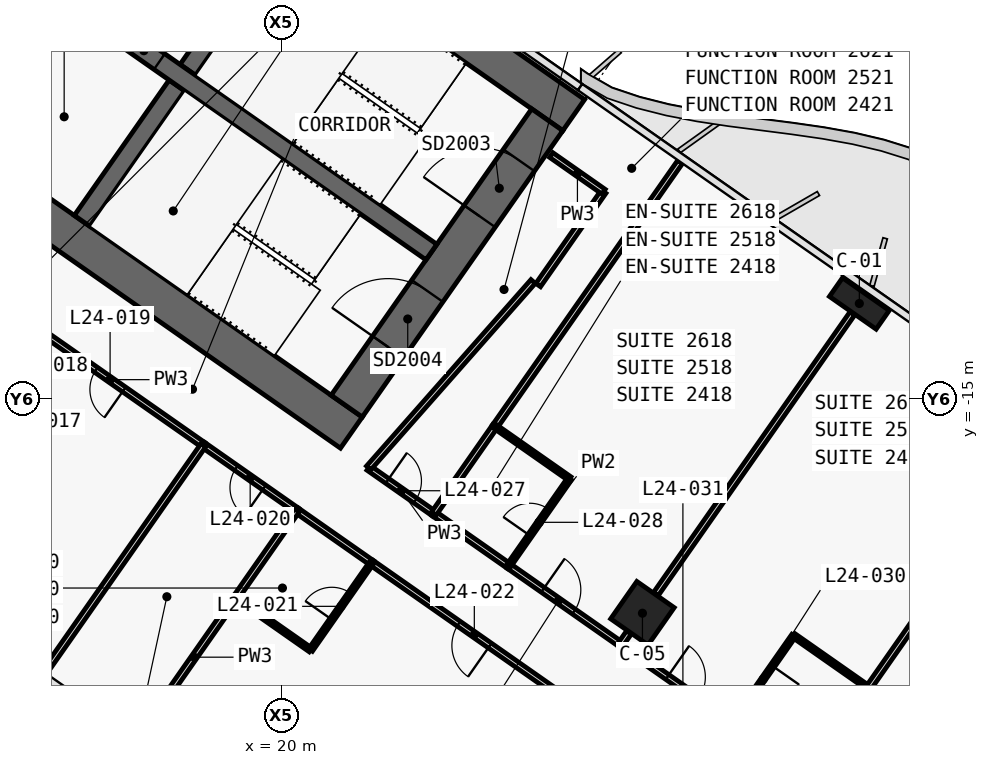
"""IFC4 building model, lengths in metres.
Left out: names, types, materials, properties, quantities, classifications, styles, units other than length and angle.
Written with IfcOpenShell. Run it as: python <this file> out.ifc"""

import sys

from ifc_helpers import new_model, si_unit, direction, frame, frame_2d, origin, origin_2d, place, context, subcontext, project, spatial, polyline, rectangle, outline, extrude, element, fill, save


model = new_model("IFC4")
c1 = context("Model", 3, precision=1e-05, world=origin(), true_north=direction((0.0, 1.0)))
c2 = subcontext(c1, "Body", "Model", "MODEL_VIEW")
j1 = project(units=[si_unit("LENGTHUNIT", "METRE"), si_unit("PLANEANGLEUNIT", "RADIAN")], contexts=[c1])
p1 = place(None, origin())
s1 = spatial("IfcSite", under=j1, at=p1, CompositionType="ELEMENT")
p2 = place(p1, origin())
s2 = spatial("IfcBuilding", under=s1, at=p2, CompositionType="ELEMENT")
p3 = place(p2, frame((0.0, 0.0, 112.1)))
s3 = spatial("IfcBuildingStorey", under=s2, at=p3, CompositionType="ELEMENT", Elevation=112.1)
p4 = place(p3, frame((-0.037, 11.867, 0.0), z_axis=(0.0, 0.0, 1.0), x_axis=(0.819155306259, -0.573571777746, 0.0)))
e1 = element("IfcWall", 1, at=p4, inside=s3, PredefinedType="SHEAR", context=c2, shape_type="SweptSolid", body=[
    extrude(outline(polyline([(33.837, 0.5), (0.0, 0.5), (0.7, -0.5), (33.837, -0.5), (33.837, 0.5)])), origin(), (0.0, 0.0, 1.0), 3.6),
])
p5 = place(p3, frame((-0.037, -0.585, 0.0), z_axis=(0.0, 0.0, 1.0), x_axis=(0.819157152511, -0.573569140985, 0.0)))
e2 = element("IfcWall", 2, at=p5, inside=s3, PredefinedType="SHEAR", context=c2, shape_type="SweptSolid", body=[
    extrude(outline(polyline([(26.695, 0.5), (0.0, 0.5), (0.7, -0.5), (26.695, -0.5), (26.695, 0.5)])), origin(), (0.0, 0.0, 1.0), 3.6),
])
p6 = place(p5, frame((6.695, 0.0, 0.0)))
e3 = element("IfcOpeningElement", 3, at=p6, cuts=e2, PredefinedType="OPENING", context=c2, shape_type="SweptSolid", body=[
    extrude(rectangle(XDim=1.5, YDim=2.1, at=frame_2d((0.75, 1.05))), frame((0.0, 0.51, 0.0), z_axis=(0.0, -1.0, 0.0), x_axis=(1.0, 0.0, 0.0)), (0.0, 0.0, 1.0), 1.02),
])
p7 = place(p5, frame((12.445, 0.0, 0.0)))
e4 = element("IfcOpeningElement", 4, at=p7, cuts=e2, PredefinedType="OPENING", context=c2, shape_type="SweptSolid", body=[
    extrude(rectangle(XDim=1.5, YDim=2.1, at=frame_2d((0.75, 1.05))), frame((0.0, 0.51, 0.0), z_axis=(0.0, -1.0, 0.0), x_axis=(1.0, 0.0, 0.0)), (0.0, 0.0, 1.0), 1.02),
])
p8 = place(p3, frame((21.708, -15.2, 0.0), z_axis=(0.0, 0.0, 1.0), x_axis=(0.573576324356, 0.819152122709, 0.0)))
e5 = element("IfcWall", 5, at=p8, inside=s3, PredefinedType="SHEAR", context=c2, shape_type="SweptSolid", body=[
    extrude(outline(polyline([(9.2, 0.5), (0.0, 0.5), (0.0, -0.5), (9.2, -0.5), (9.2, 0.5)])), origin(), (0.0, 0.0, 1.0), 3.6),
])
p9 = place(p8, frame((6.1, 0.0, 0.0)))
e6 = element("IfcOpeningElement", 6, at=p9, cuts=e5, PredefinedType="OPENING", context=c2, shape_type="SweptSolid", body=[
    extrude(rectangle(XDim=1.8, YDim=2.1, at=frame_2d((0.9, 1.05))), frame((0.0, 0.51, 0.0), z_axis=(0.0, -1.0, 0.0), x_axis=(1.0, 0.0, 0.0)), (0.0, 0.0, 1.0), 1.02),
])
p10 = place(p8, frame((1.9, 0.0, 0.0)))
e7 = element("IfcOpeningElement", 7, at=p10, cuts=e5, PredefinedType="OPENING", context=c2, shape_type="SweptSolid", body=[
    extrude(rectangle(XDim=1.8, YDim=2.1, at=frame_2d((0.9, 1.05))), frame((0.0, 0.51, 0.0), z_axis=(0.0, -1.0, 0.0), x_axis=(1.0, 0.0, 0.0)), (0.0, 0.0, 1.0), 1.02),
])
p11 = place(p3, frame((14.745, -10.324, 0.0), z_axis=(0.0, 0.0, 1.0), x_axis=(0.57356780395, 0.819158088694, 0.0)))
e8 = element("IfcWall", 8, at=p11, inside=s3, PredefinedType="SHEAR", context=c2, shape_type="SweptSolid", body=[
    extrude(outline(polyline([(0.0, 0.25), (0.0, -0.25), (4.35, -0.25), (4.35, 0.25), (0.0, 0.25)])), origin(), (0.0, 0.0, 1.0), 3.6),
])
p12 = place(p3, frame((17.527, -6.352, 0.0), z_axis=(0.0, 0.0, 1.0), x_axis=(0.573530143085, 0.819184457233, 0.0)))
e9 = element("IfcWall", 9, at=p12, inside=s3, PredefinedType="SHEAR", context=c2, shape_type="SweptSolid", body=[
    extrude(outline(polyline([(4.35, -0.25), (4.35, 0.25), (0.0, 0.25), (0.0, -0.25), (4.35, -0.25)])), origin(), (0.0, 0.0, 1.0), 3.6),
])
p13 = place(p3, frame((2.638, 3.768, 0.0), z_axis=(0.0, 0.0, 1.0), x_axis=(0.819148977158, -0.573580816643, 0.0)))
e10 = element("IfcWall", 10, at=p13, inside=s3, PredefinedType="SHEAR", context=c2, shape_type="SweptSolid", body=[
    extrude(outline(polyline([(0.0, 0.25), (0.0, -0.25), (26.0, -0.25), (26.0, 0.25), (0.0, 0.25)])), origin(), (0.0, 0.0, 1.0), 3.6),
])
p14 = place(p13, frame((9.637, 0.0, 0.0)))
e11 = element("IfcOpeningElement", 11, at=p14, cuts=e10, PredefinedType="OPENING", context=c2, shape_type="SweptSolid", body=[
    extrude(rectangle(XDim=1.2, YDim=2.1, at=frame_2d((0.6, 1.05))), frame((0.0, 0.26, 0.0), z_axis=(0.0, -1.0, 0.0), x_axis=(1.0, 0.0, 0.0)), (0.0, 0.0, 1.0), 0.52),
])
p15 = place(p13, frame((11.812, 0.0, 0.0)))
e12 = element("IfcOpeningElement", 12, at=p15, cuts=e10, PredefinedType="OPENING", context=c2, shape_type="SweptSolid", body=[
    extrude(rectangle(XDim=1.2, YDim=2.1, at=frame_2d((0.6, 1.05))), frame((0.0, 0.26, 0.0), z_axis=(0.0, -1.0, 0.0), x_axis=(1.0, 0.0, 0.0)), (0.0, 0.0, 1.0), 0.52),
])
p16 = place(p13, frame((13.988, 0.0, 0.0)))
e13 = element("IfcOpeningElement", 13, at=p16, cuts=e10, PredefinedType="OPENING", context=c2, shape_type="SweptSolid", body=[
    extrude(rectangle(XDim=1.2, YDim=2.1, at=frame_2d((0.6, 1.05))), frame((0.0, 0.26, 0.0), z_axis=(0.0, -1.0, 0.0), x_axis=(1.0, 0.0, 0.0)), (0.0, 0.0, 1.0), 0.52),
])
p17 = place(p13, frame((16.262, 0.0, 0.0)))
e14 = element("IfcOpeningElement", 14, at=p17, cuts=e10, PredefinedType="OPENING", context=c2, shape_type="SweptSolid", body=[
    extrude(rectangle(XDim=1.0, YDim=2.1, at=frame_2d((0.5, 1.05))), frame((0.0, 0.26, 0.0), z_axis=(0.0, -1.0, 0.0), x_axis=(1.0, 0.0, 0.0)), (0.0, 0.0, 1.0), 0.52),
])
p18 = place(p3, frame((35.197, -12.498, 0.0), z_axis=(0.0, 0.0, 1.0), x_axis=(0.819152044289, -0.573576436351, 0.0)))
e15 = element("IfcColumn", 15, at=p18, inside=s3, PredefinedType="COLUMN", context=c2, shape_type="SweptSolid", body=[
    extrude(rectangle(XDim=1.5, YDim=0.6, at=origin_2d()), origin(), (0.0, 0.0, 1.0), 3.6),
])
p19 = place(p3, frame((29.49, -20.649, 0.0), z_axis=(0.0, 0.0, 1.0), x_axis=(0.819152044289, -0.573576436351, 0.0)))
e16 = element("IfcColumn", 16, at=p19, inside=s3, PredefinedType="COLUMN", context=c2, shape_type="SweptSolid", body=[
    extrude(rectangle(XDim=1.2, YDim=1.2, at=origin_2d()), origin(), (0.0, 0.0, 1.0), 3.6),
])
p20 = place(p3, frame((22.284, -16.824, 0.0), z_axis=(0.0, 0.0, 1.0), x_axis=(0.819160859995, -0.573563846013, 0.0)))
e17 = element("IfcWall", 17, at=p20, inside=s3, PredefinedType="PARTITIONING", context=c2, shape_type="SweptSolid", body=[
    extrude(rectangle(XDim=2.098, YDim=0.15, at=frame_2d((1.049, 0.0))), origin(), (0.0, 0.0, 1.0), 3.32),
])
p21 = place(p20, frame((0.599, 0.0, 0.0)))
e18 = element("IfcOpeningElement", 18, at=p21, cuts=e17, PredefinedType="OPENING", context=c2, shape_type="SweptSolid", body=[
    extrude(rectangle(XDim=0.9, YDim=2.1, at=frame_2d((0.45, 1.05))), frame((0.0, 0.085, 0.0), z_axis=(0.0, -1.0, 0.0), x_axis=(1.0, 0.0, 0.0)), (0.0, 0.0, 1.0), 0.17),
])
p22 = place(p3, frame((25.966, -19.403, 0.0), z_axis=(0.0, 0.0, 1.0), x_axis=(0.81917779803, -0.57353965444, 0.0)))
e19 = element("IfcWall", 19, at=p22, inside=s3, PredefinedType="PARTITIONING", context=c2, shape_type="SweptSolid", body=[
    extrude(rectangle(XDim=3.603, YDim=0.15, at=frame_2d((1.801, 0.0))), origin(), (0.0, 0.0, 1.0), 2.6),
])
p23 = place(p22, frame((1.101, 0.0, 0.0)))
e20 = element("IfcOpeningElement", 20, at=p23, cuts=e19, PredefinedType="OPENING", context=c2, shape_type="SweptSolid", body=[
    extrude(rectangle(XDim=1.0, YDim=2.1, at=frame_2d((0.5, 1.05))), frame((0.0, 0.085, 0.0), z_axis=(0.0, -1.0, 0.0), x_axis=(1.0, 0.0, 0.0)), (0.0, 0.0, 1.0), 0.17),
])
p24 = place(p3, frame((23.999, -18.025, 0.0), z_axis=(0.0, 0.0, 1.0), x_axis=(0.819146032251, -0.573585022335, 0.0)))
e21 = element("IfcWall", 21, at=p24, inside=s3, PredefinedType="PARTITIONING", context=c2, shape_type="SweptSolid", body=[
    extrude(rectangle(XDim=2.404, YDim=0.15, at=frame_2d((1.202, 0.0))), origin(), (0.0, 0.0, 1.0), 3.32),
])
p25 = place(p3, frame((28.914, -21.467, 0.0), z_axis=(0.0, 0.0, 1.0), x_axis=(0.819145961204, -0.573585123798, 0.0)))
e22 = element("IfcWall", 22, at=p25, inside=s3, PredefinedType="PARTITIONING", context=c2, shape_type="SweptSolid", body=[
    extrude(rectangle(XDim=3.603, YDim=0.15, at=frame_2d((1.802, 0.0))), origin(), (0.0, 0.0, 1.0), 2.6),
])
p26 = place(p25, frame((1.502, 0.0, 0.0)))
e23 = element("IfcOpeningElement", 23, at=p26, cuts=e22, PredefinedType="OPENING", context=c2, shape_type="SweptSolid", body=[
    extrude(rectangle(XDim=1.0, YDim=2.1, at=frame_2d((0.5, 1.05))), frame((0.0, 0.085, 0.0), z_axis=(0.0, -1.0, 0.0), x_axis=(1.0, 0.0, 0.0)), (0.0, 0.0, 1.0), 0.17),
])
p27 = place(p3, frame((17.941, -16.224, 0.0), z_axis=(0.0, 0.0, 1.0), x_axis=(-0.819165052243, 0.573557858619, 0.0)))
e24 = element("IfcWall", 24, at=p27, inside=s3, PredefinedType="PARTITIONING", context=c2, shape_type="SweptSolid", body=[
    extrude(rectangle(XDim=6.004, YDim=0.15, at=frame_2d((3.002, 0.0))), origin(), (0.0, 0.0, 1.0), 2.6),
])
p28 = place(p27, frame((2.552, 0.0, 0.0)))
e25 = element("IfcOpeningElement", 25, at=p28, cuts=e24, PredefinedType="OPENING", context=c2, shape_type="SweptSolid", body=[
    extrude(rectangle(XDim=0.9, YDim=2.1, at=frame_2d((0.45, 1.05))), frame((0.0, 0.085, 0.0), z_axis=(0.0, -1.0, 0.0), x_axis=(1.0, 0.0, 0.0)), (0.0, 0.0, 1.0), 0.17),
])
p29 = place(p3, frame((20.398, -17.945, 0.0), z_axis=(0.0, 0.0, 1.0), x_axis=(-0.819128818764, 0.573609604409, 0.0)))
e26 = element("IfcWall", 26, at=p29, inside=s3, PredefinedType="PARTITIONING", context=c2, shape_type="SweptSolid", body=[
    extrude(rectangle(XDim=3.004, YDim=0.15, at=frame_2d((1.502, 0.0))), origin(), (0.0, 0.0, 1.0), 2.6),
])
p30 = place(p29, frame((1.052, 0.0, 0.0)))
e27 = element("IfcOpeningElement", 27, at=p30, cuts=e26, PredefinedType="OPENING", context=c2, shape_type="SweptSolid", body=[
    extrude(rectangle(XDim=0.9, YDim=2.1, at=frame_2d((0.45, 1.05))), frame((0.0, 0.085, 0.0), z_axis=(0.0, -1.0, 0.0), x_axis=(1.0, 0.0, 0.0)), (0.0, 0.0, 1.0), 0.17),
])
p31 = place(p3, frame((27.771, -23.107, 0.0), z_axis=(0.0, 0.0, 1.0), x_axis=(-0.819153746897, 0.573574004767, 0.0)))
e28 = element("IfcWall", 28, at=p31, inside=s3, PredefinedType="PARTITIONING", context=c2, shape_type="SweptSolid", body=[
    extrude(rectangle(XDim=6.603, YDim=0.15, at=frame_2d((3.302, 0.0))), origin(), (0.0, 0.0, 1.0), 2.6),
])
p32 = place(p31, frame((2.802, 0.0, 0.0)))
e29 = element("IfcOpeningElement", 29, at=p32, cuts=e28, PredefinedType="OPENING", context=c2, shape_type="SweptSolid", body=[
    extrude(rectangle(XDim=1.0, YDim=2.1, at=frame_2d((0.5, 1.05))), frame((0.0, 0.085, 0.0), z_axis=(0.0, -1.0, 0.0), x_axis=(1.0, 0.0, 0.0)), (0.0, 0.0, 1.0), 0.17),
])
p33 = place(p3, frame((22.364, -19.322, 0.0), z_axis=(0.0, 0.0, 1.0), x_axis=(-0.819146032251, 0.573585022335, 0.0)))
e30 = element("IfcWall", 30, at=p33, inside=s3, PredefinedType="PARTITIONING", context=c2, shape_type="SweptSolid", body=[
    extrude(rectangle(XDim=2.404, YDim=0.15, at=frame_2d((1.202, 0.0))), origin(), (0.0, 0.0, 1.0), 2.6),
])
p34 = place(p3, frame((30.482, -8.77, 0.0), z_axis=(0.0, 0.0, 1.0), x_axis=(-0.573576058406, -0.819152308929, 0.0)))
e31 = element("IfcWall", 31, at=p34, inside=s3, PredefinedType="PARTITIONING", context=c2, shape_type="SweptSolid", body=[
    extrude(rectangle(XDim=8.501, YDim=0.15, at=frame_2d((4.25, 0.0))), origin(), (0.0, 0.0, 1.0), 2.6),
])
p35 = place(p3, frame((25.608, -15.731, 0.0), z_axis=(0.0, 0.0, 1.0), x_axis=(-0.573596837309, -0.819137759006, 0.0)))
e32 = element("IfcWall", 32, at=p35, inside=s3, PredefinedType="PARTITIONING", context=c2, shape_type="SweptSolid", body=[
    extrude(rectangle(XDim=2.802, YDim=0.15, at=frame_2d((1.401, 0.0))), origin(), (0.0, 0.0, 1.0), 2.6),
])
p36 = place(p3, frame((22.285, -16.825, 0.0), z_axis=(0.0, 0.0, 1.0), x_axis=(0.661551268245, 0.749899939647, 0.0)))
e33 = element("IfcWall", 33, at=p36, inside=s3, PredefinedType="PARTITIONING", context=c2, shape_type="SweptSolid", body=[
    extrude(rectangle(XDim=6.541, YDim=0.15, at=frame_2d((3.271, 0.0))), origin(), (0.0, 0.0, 1.0), 2.6),
])
p37 = place(p3, frame((26.746, -12.014, 0.0), z_axis=(0.0, 0.0, 1.0), x_axis=(0.573560650686, 0.819163097304, 0.0)))
e34 = element("IfcWall", 34, at=p37, inside=s3, PredefinedType="PARTITIONING", context=c2, shape_type="SweptSolid", body=[
    extrude(rectangle(XDim=3.0, YDim=0.15, at=frame_2d((1.5, 0.0))), origin(), (0.0, 0.0, 1.0), 3.32),
])
p38 = place(p3, frame((28.467, -9.556, 0.0), z_axis=(0.0, 0.0, 1.0), x_axis=(-0.819109000826, 0.573637903879, 0.0)))
e35 = element("IfcWall", 35, at=p38, inside=s3, PredefinedType="PARTITIONING", context=c2, shape_type="SweptSolid", body=[
    extrude(rectangle(XDim=1.68, YDim=0.15, at=frame_2d((0.84, 0.0))), origin(), (0.0, 0.0, 1.0), 3.32),
])
p39 = place(p3, frame((25.968, -19.404, 0.0), z_axis=(0.0, 0.0, 1.0), x_axis=(0.573591086599, 0.819141785879, 0.0)))
e36 = element("IfcWall", 36, at=p39, inside=s3, PredefinedType="PARTITIONING", context=c2, shape_type="SweptSolid", body=[
    extrude(rectangle(XDim=2.8, YDim=0.12, at=frame_2d((1.4, 0.0))), origin(), (0.0, 0.0, 1.0), 2.6),
])
p40 = place(p39, frame((0.975, 0.0, 0.0)))
e37 = element("IfcOpeningElement", 37, at=p40, cuts=e36, PredefinedType="OPENING", context=c2, shape_type="SweptSolid", body=[
    extrude(rectangle(XDim=0.85, YDim=2.05, at=frame_2d((0.425, 1.025))), frame((0.0, 0.07, 0.0), z_axis=(0.0, -1.0, 0.0), x_axis=(1.0, 0.0, 0.0)), (0.0, 0.0, 1.0), 0.14),
])
p41 = place(p3, frame((27.573, -17.109, 0.0), z_axis=(0.0, 0.0, 1.0), x_axis=(-0.819107643868, 0.573639841501, 0.0)))
e38 = element("IfcWall", 38, at=p41, inside=s3, PredefinedType="PARTITIONING", context=c2, shape_type="SweptSolid", body=[
    extrude(rectangle(XDim=2.4, YDim=0.12, at=frame_2d((1.2, 0.0))), origin(), (0.0, 0.0, 1.0), 3.32),
])
p42 = place(p3, frame((35.013, -12.76, 0.0), z_axis=(0.0, 0.0, 1.0), x_axis=(-0.573558725113, -0.819164445546, 0.0)))
e39 = element("IfcWall", 39, at=p42, inside=s3, PredefinedType="PARTITIONING", context=c2, shape_type="SweptSolid", body=[
    extrude(rectangle(XDim=9.01, YDim=0.15, at=frame_2d((4.505, 0.0))), origin(), (0.0, 0.0, 1.0), 2.6),
])
p43 = place(p3, frame((29.134, -21.156, 0.0), z_axis=(0.0, 0.0, 1.0), x_axis=(-0.572944929411, -0.819593867633, 0.0)))
e40 = element("IfcWall", 40, at=p43, inside=s3, PredefinedType="PARTITIONING", context=c2, shape_type="SweptSolid", body=[
    extrude(rectangle(XDim=0.38, YDim=0.15, at=frame_2d((0.19, 0.0))), origin(), (0.0, 0.0, 1.0), 2.6),
])
p44 = place(p3, frame((35.438, -22.615, 0.0), z_axis=(0.0, 0.0, 1.0), x_axis=(-0.819141114317, 0.573592045652, 0.0)))
e41 = element("IfcWall", 41, at=p44, inside=s3, PredefinedType="PARTITIONING", context=c2, shape_type="SweptSolid", body=[
    extrude(rectangle(XDim=2.4, YDim=0.12, at=frame_2d((1.2, 0.0))), origin(), (0.0, 0.0, 1.0), 3.32),
])
p45 = place(p3, frame((33.47, -21.239, 0.0), z_axis=(0.0, 0.0, 1.0), x_axis=(-0.573550118428, -0.819170471667, 0.0)))
e42 = element("IfcWall", 42, at=p45, inside=s3, PredefinedType="PARTITIONING", context=c2, shape_type="SweptSolid", body=[
    extrude(rectangle(XDim=2.8, YDim=0.12, at=frame_2d((1.4, 0.0))), origin(), (0.0, 0.0, 1.0), 2.6),
])
p46 = place(p45, frame((0.975, 0.0, 0.0)))
e43 = element("IfcOpeningElement", 43, at=p46, cuts=e42, PredefinedType="OPENING", context=c2, shape_type="SweptSolid", body=[
    extrude(rectangle(XDim=0.85, YDim=2.05, at=frame_2d((0.425, 1.025))), frame((0.0, 0.07, 0.0), z_axis=(0.0, -1.0, 0.0), x_axis=(1.0, 0.0, 0.0)), (0.0, 0.0, 1.0), 0.14),
])
p47 = place(p3, frame((38.708, -17.945, 0.0), z_axis=(0.0, 0.0, 1.0), x_axis=(-0.573568678046, -0.819157476658, 0.0)))
e44 = element("IfcWall", 44, at=p47, inside=s3, PredefinedType="PARTITIONING", context=c2, shape_type="SweptSolid", body=[
    extrude(rectangle(XDim=5.701, YDim=0.15, at=frame_2d((2.851, 0.0))), origin(), (0.0, 0.0, 1.0), 3.32),
])
p48 = place(p3, frame((17.939, -16.223, 0.0), z_axis=(0.0, 0.0, 1.0), x_axis=(-0.573594765376, -0.819139209862, 0.0)))
e45 = element("IfcWall", 45, at=p48, inside=s3, PredefinedType="PARTITIONING", context=c2, shape_type="SweptSolid", body=[
    extrude(rectangle(XDim=7.3, YDim=0.15, at=frame_2d((3.65, 0.0))), origin(), (0.0, 0.0, 1.0), 2.5),
])
p49 = place(p3, frame((18.791, -20.237, 0.0), z_axis=(0.0, 0.0, 1.0), x_axis=(-0.57359919792, -0.819136105995, 0.0)))
e46 = element("IfcWall", 46, at=p49, inside=s3, PredefinedType="PARTITIONING", context=c2, shape_type="SweptSolid", body=[
    extrude(rectangle(XDim=3.831, YDim=0.15, at=frame_2d((1.916, 0.0))), origin(), (0.0, 0.0, 1.0), 2.6),
])
p50 = place(p3, frame((20.396, -17.944, 0.0), z_axis=(0.0, 0.0, 1.0), x_axis=(-0.573596837309, -0.819137759006, 0.0)))
e47 = element("IfcWall", 47, at=p50, inside=s3, PredefinedType="PARTITIONING", context=c2, shape_type="SweptSolid", body=[
    extrude(rectangle(XDim=2.802, YDim=0.15, at=frame_2d((1.401, 0.0))), origin(), (0.0, 0.0, 1.0), 2.6),
])
p51 = place(p3, frame((18.79, -20.239, 0.0), z_axis=(0.0, 0.0, 1.0), x_axis=(0.819188907105, -0.573523787192, 0.0)))
e48 = element("IfcWall", 48, at=p51, inside=s3, PredefinedType="PARTITIONING", context=c2, shape_type="SweptSolid", body=[
    extrude(rectangle(XDim=2.4, YDim=0.12, at=frame_2d((1.2, 0.0))), origin(), (0.0, 0.0, 1.0), 2.6),
])
p52 = place(p3, frame((20.757, -21.615, 0.0), z_axis=(0.0, 0.0, 1.0), x_axis=(0.57364959175, 0.819100815459, 0.0)))
e49 = element("IfcWall", 49, at=p52, inside=s3, PredefinedType="PARTITIONING", context=c2, shape_type="SweptSolid", body=[
    extrude(rectangle(XDim=2.8, YDim=0.12, at=frame_2d((1.4, 0.0))), origin(), (0.0, 0.0, 1.0), 3.32),
])
p53 = place(p52, frame((0.975, 0.0, 0.0)))
e50 = element("IfcOpeningElement", 50, at=p53, cuts=e49, PredefinedType="OPENING", context=c2, shape_type="SweptSolid", body=[
    extrude(rectangle(XDim=0.85, YDim=2.05, at=frame_2d((0.425, 1.025))), frame((0.0, 0.07, 0.0), z_axis=(0.0, -1.0, 0.0), x_axis=(1.0, 0.0, 0.0)), (0.0, 0.0, 1.0), 0.14),
])
p54 = place(p17, origin())
e51 = element("IfcDoor", 51, at=p54, inside=s3, OperationType="SINGLE_SWING_RIGHT", PredefinedType="DOOR", context=c2, shape_type="SweptSolid", body=[
    extrude(rectangle(XDim=1.0, YDim=2.1, at=frame_2d((0.5, 1.05))), frame((0.0, 0.025, 0.0), z_axis=(0.0, -1.0, 0.0), x_axis=(1.0, 0.0, 0.0)), (0.0, 0.0, 1.0), 0.05),
])
fill(e14, e51)
p55 = place(p9, origin())
e52 = element("IfcDoor", 52, at=p55, inside=s3, OperationType="DOUBLE_DOOR_SINGLE_SWING", PredefinedType="DOOR", context=c2, shape_type="SweptSolid", body=[
    extrude(rectangle(XDim=1.8, YDim=2.1, at=frame_2d((0.9, 1.05))), frame((0.0, 0.025, 0.0), z_axis=(0.0, -1.0, 0.0), x_axis=(1.0, 0.0, 0.0)), (0.0, 0.0, 1.0), 0.05),
])
fill(e6, e52)
p56 = place(p10, origin())
e53 = element("IfcDoor", 53, at=p56, inside=s3, OperationType="DOUBLE_DOOR_SINGLE_SWING", PredefinedType="DOOR", context=c2, shape_type="SweptSolid", body=[
    extrude(rectangle(XDim=1.8, YDim=2.1, at=frame_2d((0.9, 1.05))), frame((0.0, 0.025, 0.0), z_axis=(0.0, -1.0, 0.0), x_axis=(1.0, 0.0, 0.0)), (0.0, 0.0, 1.0), 0.05),
])
fill(e7, e53)
p57 = place(p28, origin())
e54 = element("IfcDoor", 54, at=p57, inside=s3, OperationType="SINGLE_SWING_LEFT", PredefinedType="DOOR", context=c2, shape_type="SweptSolid", body=[
    extrude(rectangle(XDim=0.9, YDim=2.1, at=frame_2d((0.45, 1.05))), frame((0.0, 0.025, 0.0), z_axis=(0.0, -1.0, 0.0), x_axis=(1.0, 0.0, 0.0)), (0.0, 0.0, 1.0), 0.05),
])
fill(e25, e54)
p58 = place(p30, origin())
e55 = element("IfcDoor", 55, at=p58, inside=s3, OperationType="SINGLE_SWING_LEFT", PredefinedType="DOOR", context=c2, shape_type="SweptSolid", body=[
    extrude(rectangle(XDim=0.9, YDim=2.1, at=frame_2d((0.45, 1.05))), frame((0.0, 0.025, 0.0), z_axis=(0.0, -1.0, 0.0), x_axis=(1.0, 0.0, 0.0)), (0.0, 0.0, 1.0), 0.05),
])
fill(e27, e55)
p59 = place(p53, origin())
e56 = element("IfcDoor", 56, at=p59, inside=s3, OperationType="SINGLE_SWING_LEFT", PredefinedType="DOOR", context=c2, shape_type="SweptSolid", body=[
    extrude(rectangle(XDim=0.85, YDim=2.05, at=frame_2d((0.425, 1.025))), frame((0.0, 0.025, 0.0), z_axis=(0.0, -1.0, 0.0), x_axis=(1.0, 0.0, 0.0)), (0.0, 0.0, 1.0), 0.05),
])
fill(e50, e56)
p60 = place(p32, origin())
e57 = element("IfcDoor", 57, at=p60, inside=s3, OperationType="SINGLE_SWING_LEFT", PredefinedType="DOOR", context=c2, shape_type="SweptSolid", body=[
    extrude(rectangle(XDim=1.0, YDim=2.1, at=frame_2d((0.5, 1.05))), frame((0.0, 0.025, 0.0), z_axis=(0.0, -1.0, 0.0), x_axis=(1.0, 0.0, 0.0)), (0.0, 0.0, 1.0), 0.05),
])
fill(e29, e57)
p61 = place(p21, origin())
e58 = element("IfcDoor", 58, at=p61, inside=s3, OperationType="SINGLE_SWING_LEFT", PredefinedType="DOOR", context=c2, shape_type="SweptSolid", body=[
    extrude(rectangle(XDim=0.9, YDim=2.1, at=frame_2d((0.45, 1.05))), frame((0.0, 0.025, 0.0), z_axis=(0.0, -1.0, 0.0), x_axis=(1.0, 0.0, 0.0)), (0.0, 0.0, 1.0), 0.05),
])
fill(e18, e58)
p62 = place(p40, origin())
e59 = element("IfcDoor", 59, at=p62, inside=s3, OperationType="SINGLE_SWING_RIGHT", PredefinedType="DOOR", context=c2, shape_type="SweptSolid", body=[
    extrude(rectangle(XDim=0.85, YDim=2.05, at=frame_2d((0.425, 1.025))), frame((0.0, 0.025, 0.0), z_axis=(0.0, -1.0, 0.0), x_axis=(1.0, 0.0, 0.0)), (0.0, 0.0, 1.0), 0.05),
])
fill(e37, e59)
p63 = place(p23, origin())
e60 = element("IfcDoor", 60, at=p63, inside=s3, OperationType="SINGLE_SWING_LEFT", PredefinedType="DOOR", context=c2, shape_type="SweptSolid", body=[
    extrude(rectangle(XDim=1.0, YDim=2.1, at=frame_2d((0.5, 1.05))), frame((0.0, 0.025, 0.0), z_axis=(0.0, -1.0, 0.0), x_axis=(1.0, 0.0, 0.0)), (0.0, 0.0, 1.0), 0.05),
])
fill(e20, e60)
p64 = place(p46, origin())
e61 = element("IfcDoor", 61, at=p64, inside=s3, OperationType="SINGLE_SWING_RIGHT", PredefinedType="DOOR", context=c2, shape_type="SweptSolid", body=[
    extrude(rectangle(XDim=0.85, YDim=2.05, at=frame_2d((0.425, 1.025))), frame((0.0, 0.025, 0.0), z_axis=(0.0, -1.0, 0.0), x_axis=(1.0, 0.0, 0.0)), (0.0, 0.0, 1.0), 0.05),
])
fill(e43, e61)
p65 = place(p26, origin())
e62 = element("IfcDoor", 62, at=p65, inside=s3, OperationType="SINGLE_SWING_LEFT", PredefinedType="DOOR", context=c2, shape_type="SweptSolid", body=[
    extrude(rectangle(XDim=1.0, YDim=2.1, at=frame_2d((0.5, 1.05))), frame((0.0, 0.025, 0.0), z_axis=(0.0, -1.0, 0.0), x_axis=(1.0, 0.0, 0.0)), (0.0, 0.0, 1.0), 0.05),
])
fill(e23, e62)
save(model, sys.argv[1])
